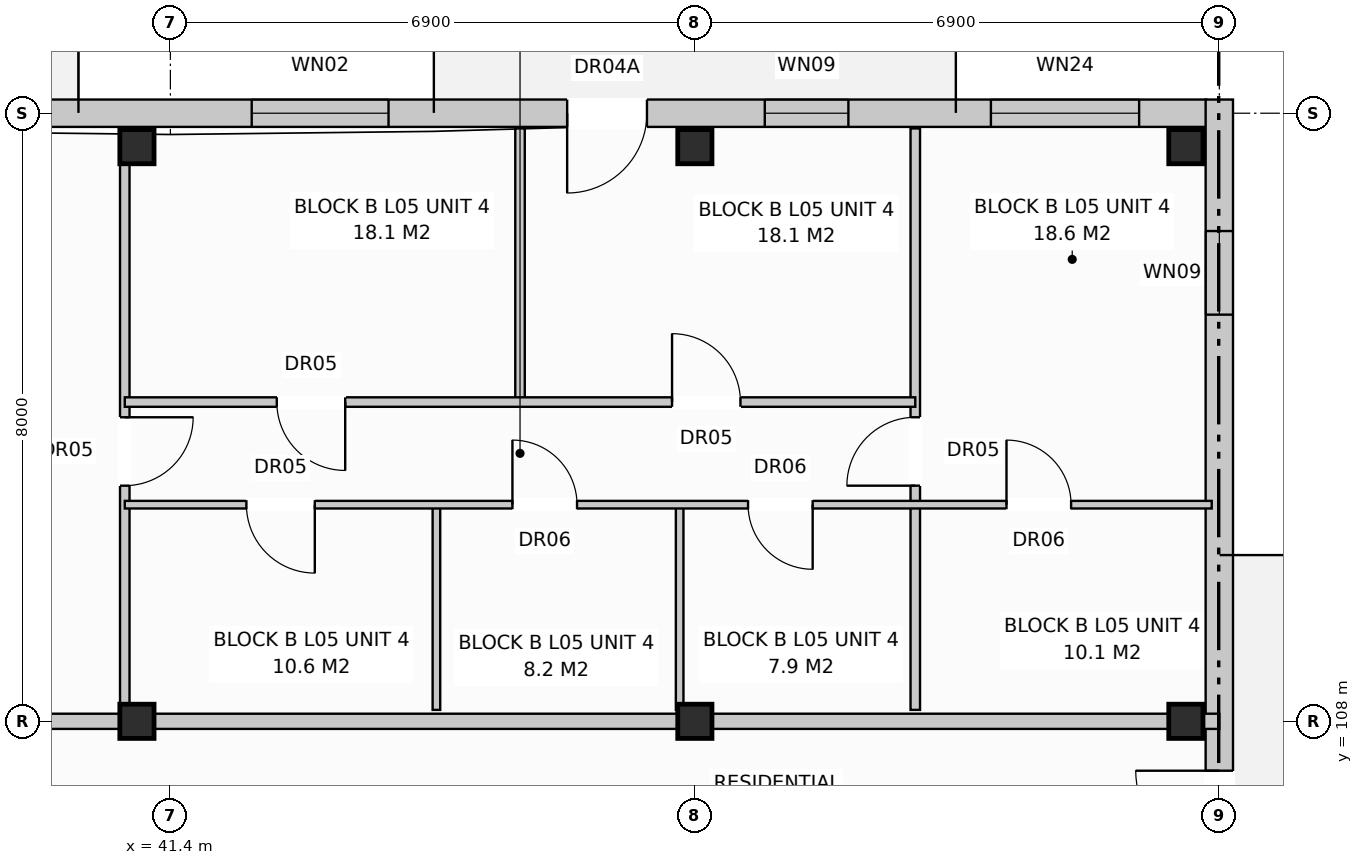
"""IFC4 building model, lengths in metres.
Left out: names, types, materials, properties, quantities, classifications, styles, units other than length and angle.
Written with IfcOpenShell. Run it as: python <this file> out.ifc"""

import sys

from ifc_helpers import new_model, si_unit, direction, frame, frame_2d, origin, origin_with_axes, origin_2d, place, context, subcontext, project, spatial, rectangle, extrude, element, fill, save


model = new_model("IFC4")
c1 = context("Model", 3, precision=1e-05, world=origin(), true_north=direction((0.0, 1.0)))
c2 = subcontext(c1, "Body", "Model", "MODEL_VIEW")
j1 = project(units=[si_unit("LENGTHUNIT", "METRE"), si_unit("PLANEANGLEUNIT", "RADIAN")], contexts=[c1])
p1 = place(None, origin())
s1 = spatial("IfcSite", under=j1, at=p1, CompositionType="ELEMENT")
p2 = place(p1, origin())
s2 = spatial("IfcBuilding", under=s1, at=p2, CompositionType="ELEMENT")
p3 = place(p2, frame((0.0, 0.0, 17.6)))
s3 = spatial("IfcBuildingStorey", under=s2, at=p3, CompositionType="ELEMENT", Elevation=17.6)
for number, where, z_axis, x_axis in (
    (1, (40.96, 108.0, 0.0), (0.0, 0.0, 1.0), (1.0, 0.0, 0.0)),
    (2, (40.96, 115.56, 0.0), (0.0, 0.0, 1.0), (1.0, 0.0, 0.0)),
    (3, (48.3, 108.0, 0.0), (0.0, 0.0, 1.0), (1.0, 0.0, 0.0)),
    (4, (48.3, 115.56, 0.0), (0.0, 0.0, 1.0), (1.0, 0.0, 0.0)),
    (5, (54.76, 108.0, 0.0), (0.0, 0.0, 1.0), (1.0, 0.0, 0.0)),
    (6, (54.76, 115.56, 0.0), (0.0, 0.0, 1.0), (1.0, 0.0, 0.0)),
):
    element("IfcColumn", number, at=place(p3, frame(where, z_axis=z_axis, x_axis=x_axis)), inside=s3, PredefinedType="COLUMN", context=c2, shape_type="SweptSolid", body=[
        extrude(rectangle(XDim=0.45, YDim=0.45, at=origin_2d()), origin(), (0.0, 0.0, 1.0), 3.2),
    ])
p4 = place(p3, frame((0.17, 116.0, 0.0), z_axis=(0.0, 0.0, 1.0), x_axis=(1.0, 0.0, 0.0)))
e7 = element("IfcWall", 7, at=p4, inside=s3, PredefinedType="STANDARD", context=c2, shape_type="SweptSolid", body=[
    extrude(rectangle(XDim=54.86, YDim=0.36, at=frame_2d((27.43, 0.0))), origin(), (0.0, 0.0, 1.0), 2.95),
])
p5 = place(p4, frame((2.459, 0.0, 0.0)))
e8 = element("IfcOpeningElement", 8, at=p5, cuts=e7, PredefinedType="OPENING", context=c2, shape_type="SweptSolid", body=[
    extrude(rectangle(XDim=1.05, YDim=2.12, at=frame_2d((0.525, 1.06))), frame((0.0, 0.192, 0.0), z_axis=(0.0, -1.0, 0.0), x_axis=(1.0, 0.0, 0.0)), (0.0, 0.0, 1.0), 0.384),
])
p6 = place(p4, frame((18.85, 0.0, 0.0)))
e9 = element("IfcOpeningElement", 9, at=p6, cuts=e7, PredefinedType="OPENING", context=c2, shape_type="SweptSolid", body=[
    extrude(rectangle(XDim=1.05, YDim=2.12, at=frame_2d((0.525, 1.06))), frame((0.0, 0.192, 0.0), z_axis=(0.0, -1.0, 0.0), x_axis=(1.0, 0.0, 0.0)), (0.0, 0.0, 1.0), 0.384),
])
p7 = place(p4, frame((28.76, 0.0, 0.0)))
e10 = element("IfcOpeningElement", 10, at=p7, cuts=e7, PredefinedType="OPENING", context=c2, shape_type="SweptSolid", body=[
    extrude(rectangle(XDim=1.05, YDim=2.12, at=frame_2d((0.525, 1.06))), frame((0.0, 0.192, 0.0), z_axis=(0.0, -1.0, 0.0), x_axis=(1.0, 0.0, 0.0)), (0.0, 0.0, 1.0), 0.384),
])
p8 = place(p4, frame((46.45, 0.0, 0.0)))
e11 = element("IfcOpeningElement", 11, at=p8, cuts=e7, PredefinedType="OPENING", context=c2, shape_type="SweptSolid", body=[
    extrude(rectangle(XDim=1.05, YDim=2.12, at=frame_2d((0.525, 1.06))), frame((0.0, 0.192, 0.0), z_axis=(0.0, -1.0, 0.0), x_axis=(1.0, 0.0, 0.0)), (0.0, 0.0, 1.0), 0.384),
])
p9 = place(p4, frame((0.75, 0.0, 0.72)))
e12 = element("IfcOpeningElement", 12, at=p9, cuts=e7, PredefinedType="OPENING", context=c2, shape_type="SweptSolid", body=[
    extrude(rectangle(XDim=1.1, YDim=1.5, at=frame_2d((0.55, 0.75))), frame((0.0, 0.192, 0.0), z_axis=(0.0, -1.0, 0.0), x_axis=(1.0, 0.0, 0.0)), (0.0, 0.0, 1.0), 0.384),
])
p10 = place(p4, frame((4.225, 0.0, 0.8)))
e13 = element("IfcOpeningElement", 13, at=p10, cuts=e7, PredefinedType="OPENING", context=c2, shape_type="SweptSolid", body=[
    extrude(rectangle(XDim=1.95, YDim=1.65, at=frame_2d((0.975, 0.825))), frame((0.0, 0.192, 0.0), z_axis=(0.0, -1.0, 0.0), x_axis=(1.0, 0.0, 0.0)), (0.0, 0.0, 1.0), 0.384),
])
p11 = place(p4, frame((8.0, 0.0, 0.8)))
e14 = element("IfcOpeningElement", 14, at=p11, cuts=e7, PredefinedType="OPENING", context=c2, shape_type="SweptSolid", body=[
    extrude(rectangle(XDim=1.8, YDim=1.7, at=frame_2d((0.9, 0.85))), frame((0.0, 0.192, 0.0), z_axis=(0.0, -1.0, 0.0), x_axis=(1.0, 0.0, 0.0)), (0.0, 0.0, 1.0), 0.384),
])
p12 = place(p4, frame((11.65, 0.0, 0.72)))
e15 = element("IfcOpeningElement", 15, at=p12, cuts=e7, PredefinedType="OPENING", context=c2, shape_type="SweptSolid", body=[
    extrude(rectangle(XDim=1.1, YDim=1.5, at=frame_2d((0.55, 0.75))), frame((0.0, 0.192, 0.0), z_axis=(0.0, -1.0, 0.0), x_axis=(1.0, 0.0, 0.0)), (0.0, 0.0, 1.0), 0.384),
])
p13 = place(p4, frame((16.675, 0.0, 0.8)))
e16 = element("IfcOpeningElement", 16, at=p13, cuts=e7, PredefinedType="OPENING", context=c2, shape_type="SweptSolid", body=[
    extrude(rectangle(XDim=1.95, YDim=1.65, at=frame_2d((0.975, 0.825))), frame((0.0, 0.192, 0.0), z_axis=(0.0, -1.0, 0.0), x_axis=(1.0, 0.0, 0.0)), (0.0, 0.0, 1.0), 0.384),
])
p14 = place(p4, frame((22.3, 0.0, 0.8)))
e17 = element("IfcOpeningElement", 17, at=p14, cuts=e7, PredefinedType="OPENING", context=c2, shape_type="SweptSolid", body=[
    extrude(rectangle(XDim=1.8, YDim=1.7, at=frame_2d((0.9, 0.85))), frame((0.0, 0.192, 0.0), z_axis=(0.0, -1.0, 0.0), x_axis=(1.0, 0.0, 0.0)), (0.0, 0.0, 1.0), 0.384),
])
p15 = place(p4, frame((31.15, 0.0, 0.72)))
e18 = element("IfcOpeningElement", 18, at=p15, cuts=e7, PredefinedType="OPENING", context=c2, shape_type="SweptSolid", body=[
    extrude(rectangle(XDim=1.9, YDim=1.85, at=frame_2d((0.95, 0.925))), frame((0.0, 0.192, 0.0), z_axis=(0.0, -1.0, 0.0), x_axis=(1.0, 0.0, 0.0)), (0.0, 0.0, 1.0), 0.384),
])
p16 = place(p4, frame((36.525, 0.0, 0.8)))
e19 = element("IfcOpeningElement", 19, at=p16, cuts=e7, PredefinedType="OPENING", context=c2, shape_type="SweptSolid", body=[
    extrude(rectangle(XDim=1.95, YDim=1.65, at=frame_2d((0.975, 0.825))), frame((0.0, 0.192, 0.0), z_axis=(0.0, -1.0, 0.0), x_axis=(1.0, 0.0, 0.0)), (0.0, 0.0, 1.0), 0.384),
])
p17 = place(p4, frame((42.3, 0.0, 0.8)))
e20 = element("IfcOpeningElement", 20, at=p17, cuts=e7, PredefinedType="OPENING", context=c2, shape_type="SweptSolid", body=[
    extrude(rectangle(XDim=1.8, YDim=1.7, at=frame_2d((0.9, 0.85))), frame((0.0, 0.192, 0.0), z_axis=(0.0, -1.0, 0.0), x_axis=(1.0, 0.0, 0.0)), (0.0, 0.0, 1.0), 0.384),
])
p18 = place(p4, frame((49.05, 0.0, 0.72)))
e21 = element("IfcOpeningElement", 21, at=p18, cuts=e7, PredefinedType="OPENING", context=c2, shape_type="SweptSolid", body=[
    extrude(rectangle(XDim=1.1, YDim=1.5, at=frame_2d((0.55, 0.75))), frame((0.0, 0.192, 0.0), z_axis=(0.0, -1.0, 0.0), x_axis=(1.0, 0.0, 0.0)), (0.0, 0.0, 1.0), 0.384),
])
p19 = place(p4, frame((52.025, 0.0, 0.8)))
e22 = element("IfcOpeningElement", 22, at=p19, cuts=e7, PredefinedType="OPENING", context=c2, shape_type="SweptSolid", body=[
    extrude(rectangle(XDim=1.95, YDim=1.65, at=frame_2d((0.975, 0.825))), frame((0.0, 0.192, 0.0), z_axis=(0.0, -1.0, 0.0), x_axis=(1.0, 0.0, 0.0)), (0.0, 0.0, 1.0), 0.384),
])
p20 = place(p3, frame((55.2, 97.42, 0.0), z_axis=(0.0, 0.0, 1.0), x_axis=(0.0, 1.0, 0.0)))
e23 = element("IfcWall", 23, at=p20, inside=s3, PredefinedType="STANDARD", context=c2, shape_type="SweptSolid", body=[
    extrude(rectangle(XDim=18.76, YDim=0.36, at=frame_2d((9.38, 0.0))), origin(), (0.0, 0.0, 1.0), 2.95),
])
p21 = place(p20, frame((8.83, 0.0, 0.0)))
e24 = element("IfcOpeningElement", 24, at=p21, cuts=e23, PredefinedType="OPENING", context=c2, shape_type="SweptSolid", body=[
    extrude(rectangle(XDim=1.1, YDim=2.1, at=frame_2d((0.55, 1.05))), frame((0.0, 0.192, 0.0), z_axis=(0.0, -1.0, 0.0), x_axis=(1.0, 0.0, 0.0)), (0.0, 0.0, 1.0), 0.384),
])
p22 = place(p20, frame((1.73, 0.0, 0.72)))
e25 = element("IfcOpeningElement", 25, at=p22, cuts=e23, PredefinedType="OPENING", context=c2, shape_type="SweptSolid", body=[
    extrude(rectangle(XDim=1.1, YDim=1.5, at=frame_2d((0.55, 0.75))), frame((0.0, 0.192, 0.0), z_axis=(0.0, -1.0, 0.0), x_axis=(1.0, 0.0, 0.0)), (0.0, 0.0, 1.0), 0.384),
])
p23 = place(p20, frame((15.93, 0.0, 0.72)))
e26 = element("IfcOpeningElement", 26, at=p23, cuts=e23, PredefinedType="OPENING", context=c2, shape_type="SweptSolid", body=[
    extrude(rectangle(XDim=1.1, YDim=1.5, at=frame_2d((0.55, 0.75))), frame((0.0, 0.192, 0.0), z_axis=(0.0, -1.0, 0.0), x_axis=(1.0, 0.0, 0.0)), (0.0, 0.0, 1.0), 0.384),
])
p24 = place(p3, frame((34.5, 108.0, 0.0), z_axis=(0.0, 0.0, 1.0), x_axis=(1.0, 0.0, 0.0)))
e27 = element("IfcWall", 27, at=p24, inside=s3, PredefinedType="PARTITIONING", context=c2, shape_type="SweptSolid", body=[
    extrude(rectangle(XDim=20.7, YDim=0.2, at=frame_2d((10.35, 0.0))), origin(), (0.0, 0.0, 1.0), 2.39),
])
p25 = place(p24, frame((2.4, 0.0, 0.0)))
e28 = element("IfcOpeningElement", 28, at=p25, cuts=e27, PredefinedType="OPENING", context=c2, shape_type="SweptSolid", body=[
    extrude(rectangle(XDim=0.95, YDim=2.15, at=frame_2d((0.475, 1.075))), frame((0.0, 0.112, 0.0), z_axis=(0.0, -1.0, 0.0), x_axis=(1.0, 0.0, 0.0)), (0.0, 0.0, 1.0), 0.224),
])
p26 = place(p3, frame((40.8, 108.15, 0.0), z_axis=(0.0, 0.0, 1.0), x_axis=(0.0, 1.0, 0.0)))
e29 = element("IfcWall", 29, at=p26, inside=s3, PredefinedType="PARTITIONING", context=c2, shape_type="SweptSolid", body=[
    extrude(rectangle(XDim=7.65, YDim=0.125, at=frame_2d((3.825, 0.0))), origin(), (0.0, 0.0, 1.0), 2.59),
])
p27 = place(p26, frame((2.95, 0.0, 0.0)))
e30 = element("IfcOpeningElement", 30, at=p27, cuts=e29, PredefinedType="OPENING", context=c2, shape_type="SweptSolid", body=[
    extrude(rectangle(XDim=0.9, YDim=2.1, at=frame_2d((0.45, 1.05))), frame((0.0, 0.074, 0.0), z_axis=(0.0, -1.0, 0.0), x_axis=(1.0, 0.0, 0.0)), (0.0, 0.0, 1.0), 0.149),
])
p28 = place(p3, frame((44.9, 108.15, 0.0), z_axis=(0.0, 0.0, 1.0), x_axis=(0.0, 1.0, 0.0)))
e31 = element("IfcWall", 31, at=p28, inside=s3, PredefinedType="PARTITIONING", context=c2, shape_type="SweptSolid", body=[
    extrude(rectangle(XDim=2.7, YDim=0.1, at=frame_2d((1.35, 0.0))), origin(), (0.0, 0.0, 1.0), 2.95),
])
p29 = place(p3, frame((48.1, 108.15, 0.0), z_axis=(0.0, 0.0, 1.0), x_axis=(0.0, 1.0, 0.0)))
e32 = element("IfcWall", 32, at=p29, inside=s3, PredefinedType="PARTITIONING", context=c2, shape_type="SweptSolid", body=[
    extrude(rectangle(XDim=2.7, YDim=0.1, at=frame_2d((1.35, 0.0))), origin(), (0.0, 0.0, 1.0), 2.39),
])
p30 = place(p3, frame((46.0, 112.2, 0.0), z_axis=(0.0, 0.0, 1.0), x_axis=(0.0, 1.0, 0.0)))
e33 = element("IfcWall", 33, at=p30, inside=s3, PredefinedType="PARTITIONING", context=c2, shape_type="SweptSolid", body=[
    extrude(rectangle(XDim=3.6, YDim=0.125, at=frame_2d((1.8, 0.0))), origin(), (0.0, 0.0, 1.0), 2.59),
])
p31 = place(p3, frame((51.2, 108.15, 0.0), z_axis=(0.0, 0.0, 1.0), x_axis=(0.0, 1.0, 0.0)))
e34 = element("IfcWall", 34, at=p31, inside=s3, PredefinedType="PARTITIONING", context=c2, shape_type="SweptSolid", body=[
    extrude(rectangle(XDim=7.65, YDim=0.125, at=frame_2d((3.825, 0.0))), origin(), (0.0, 0.0, 1.0), 2.95),
])
p32 = place(p31, frame((2.95, 0.0, 0.0)))
e35 = element("IfcOpeningElement", 35, at=p32, cuts=e34, PredefinedType="OPENING", context=c2, shape_type="SweptSolid", body=[
    extrude(rectangle(XDim=0.9, YDim=2.1, at=frame_2d((0.45, 1.05))), frame((0.0, 0.074, 0.0), z_axis=(0.0, -1.0, 0.0), x_axis=(1.0, 0.0, 0.0)), (0.0, 0.0, 1.0), 0.149),
])
p33 = place(p3, frame((40.8, 110.85, 0.0), z_axis=(0.0, 0.0, 1.0), x_axis=(1.0, 0.0, 0.0)))
e36 = element("IfcWall", 36, at=p33, inside=s3, PredefinedType="PARTITIONING", context=c2, shape_type="SweptSolid", body=[
    extrude(rectangle(XDim=14.3, YDim=0.1, at=frame_2d((7.15, 0.0))), origin(), (0.0, 0.0, 1.0), 2.95),
])
p34 = place(p33, frame((1.6, 0.0, 0.0)))
e37 = element("IfcOpeningElement", 37, at=p34, cuts=e36, PredefinedType="OPENING", context=c2, shape_type="SweptSolid", body=[
    extrude(rectangle(XDim=0.9, YDim=2.1, at=frame_2d((0.45, 1.05))), frame((0.0, 0.062, 0.0), z_axis=(0.0, -1.0, 0.0), x_axis=(1.0, 0.0, 0.0)), (0.0, 0.0, 1.0), 0.124),
])
p35 = place(p33, frame((5.1, 0.0, 0.0)))
e38 = element("IfcOpeningElement", 38, at=p35, cuts=e36, PredefinedType="OPENING", context=c2, shape_type="SweptSolid", body=[
    extrude(rectangle(XDim=0.85, YDim=2.05, at=frame_2d((0.425, 1.025))), frame((0.0, 0.062, 0.0), z_axis=(0.0, -1.0, 0.0), x_axis=(1.0, 0.0, 0.0)), (0.0, 0.0, 1.0), 0.124),
])
p36 = place(p33, frame((8.2, 0.0, 0.0)))
e39 = element("IfcOpeningElement", 39, at=p36, cuts=e36, PredefinedType="OPENING", context=c2, shape_type="SweptSolid", body=[
    extrude(rectangle(XDim=0.85, YDim=2.05, at=frame_2d((0.425, 1.025))), frame((0.0, 0.062, 0.0), z_axis=(0.0, -1.0, 0.0), x_axis=(1.0, 0.0, 0.0)), (0.0, 0.0, 1.0), 0.124),
])
p37 = place(p33, frame((11.6, 0.0, 0.0)))
e40 = element("IfcOpeningElement", 40, at=p37, cuts=e36, PredefinedType="OPENING", context=c2, shape_type="SweptSolid", body=[
    extrude(rectangle(XDim=0.85, YDim=2.05, at=frame_2d((0.425, 1.025))), frame((0.0, 0.062, 0.0), z_axis=(0.0, -1.0, 0.0), x_axis=(1.0, 0.0, 0.0)), (0.0, 0.0, 1.0), 0.124),
])
p38 = place(p3, frame((40.8, 112.2, 0.0), z_axis=(0.0, 0.0, 1.0), x_axis=(1.0, 0.0, 0.0)))
e41 = element("IfcWall", 41, at=p38, inside=s3, PredefinedType="PARTITIONING", context=c2, shape_type="SweptSolid", body=[
    extrude(rectangle(XDim=10.4, YDim=0.125, at=frame_2d((5.2, 0.0))), origin(), (0.0, 0.0, 1.0), 2.95),
])
p39 = place(p38, frame((2.0, 0.0, 0.0)))
e42 = element("IfcOpeningElement", 42, at=p39, cuts=e41, PredefinedType="OPENING", context=c2, shape_type="SweptSolid", body=[
    extrude(rectangle(XDim=0.9, YDim=2.1, at=frame_2d((0.45, 1.05))), frame((0.0, 0.074, 0.0), z_axis=(0.0, -1.0, 0.0), x_axis=(1.0, 0.0, 0.0)), (0.0, 0.0, 1.0), 0.149),
])
p40 = place(p38, frame((7.2, 0.0, 0.0)))
e43 = element("IfcOpeningElement", 43, at=p40, cuts=e41, PredefinedType="OPENING", context=c2, shape_type="SweptSolid", body=[
    extrude(rectangle(XDim=0.9, YDim=2.1, at=frame_2d((0.45, 1.05))), frame((0.0, 0.074, 0.0), z_axis=(0.0, -1.0, 0.0), x_axis=(1.0, 0.0, 0.0)), (0.0, 0.0, 1.0), 0.149),
])
p41 = place(p8, frame((1.05, 0.0, 0.0), z_axis=(0.0, 0.0, 1.0), x_axis=(-1.0, 0.0, 0.0)))
e44 = element("IfcDoor", 44, at=p41, inside=s3, OperationType="SINGLE_SWING_LEFT", PredefinedType="DOOR", context=c2, shape_type="SweptSolid", body=[
    extrude(rectangle(XDim=1.05, YDim=2.12, at=frame_2d((0.525, 1.06))), frame((0.0, 0.025, 0.0), z_axis=(0.0, -1.0, 0.0), x_axis=(1.0, 0.0, 0.0)), (0.0, 0.0, 1.0), 0.05),
])
fill(e11, e44)
p42 = place(p17, origin_with_axes())
e45 = element("IfcWindow", 45, at=p42, inside=s3, PartitioningType="SINGLE_PANEL", PredefinedType="WINDOW", context=c2, shape_type="SweptSolid", body=[
    extrude(rectangle(XDim=1.8, YDim=1.7, at=frame_2d((0.9, 0.85))), frame((0.0, 0.03, 0.0), z_axis=(0.0, -1.0, 0.0), x_axis=(1.0, 0.0, 0.0)), (0.0, 0.0, 1.0), 0.06),
])
fill(e20, e45)
p43 = place(p18, origin_with_axes())
e46 = element("IfcWindow", 46, at=p43, inside=s3, PartitioningType="SINGLE_PANEL", PredefinedType="WINDOW", context=c2, shape_type="SweptSolid", body=[
    extrude(rectangle(XDim=1.1, YDim=1.5, at=frame_2d((0.55, 0.75))), frame((0.0, 0.03, 0.0), z_axis=(0.0, -1.0, 0.0), x_axis=(1.0, 0.0, 0.0)), (0.0, 0.0, 1.0), 0.06),
])
fill(e21, e46)
p44 = place(p19, origin_with_axes())
e47 = element("IfcWindow", 47, at=p44, inside=s3, PartitioningType="SINGLE_PANEL", PredefinedType="WINDOW", context=c2, shape_type="SweptSolid", body=[
    extrude(rectangle(XDim=1.95, YDim=1.65, at=frame_2d((0.975, 0.825))), frame((0.0, 0.03, 0.0), z_axis=(0.0, -1.0, 0.0), x_axis=(1.0, 0.0, 0.0)), (0.0, 0.0, 1.0), 0.06),
])
fill(e22, e47)
p45 = place(p21, origin_with_axes())
e48 = element("IfcDoor", 48, at=p45, inside=s3, OperationType="SINGLE_SWING_RIGHT", PredefinedType="DOOR", context=c2, shape_type="SweptSolid", body=[
    extrude(rectangle(XDim=1.1, YDim=2.1, at=frame_2d((0.55, 1.05))), frame((0.0, 0.025, 0.0), z_axis=(0.0, -1.0, 0.0), x_axis=(1.0, 0.0, 0.0)), (0.0, 0.0, 1.0), 0.05),
])
fill(e24, e48)
p46 = place(p23, origin_with_axes())
e49 = element("IfcWindow", 49, at=p46, inside=s3, PartitioningType="SINGLE_PANEL", PredefinedType="WINDOW", context=c2, shape_type="SweptSolid", body=[
    extrude(rectangle(XDim=1.1, YDim=1.5, at=frame_2d((0.55, 0.75))), frame((0.0, 0.03, 0.0), z_axis=(0.0, -1.0, 0.0), x_axis=(1.0, 0.0, 0.0)), (0.0, 0.0, 1.0), 0.06),
])
fill(e26, e49)
p47 = place(p27, frame((0.9, 0.0, 0.0), z_axis=(0.0, 0.0, 1.0), x_axis=(-1.0, 0.0, 0.0)))
e50 = element("IfcDoor", 50, at=p47, inside=s3, OperationType="SINGLE_SWING_RIGHT", PredefinedType="DOOR", context=c2, shape_type="SweptSolid", body=[
    extrude(rectangle(XDim=0.9, YDim=2.1, at=frame_2d((0.45, 1.05))), frame((0.0, 0.025, 0.0), z_axis=(0.0, -1.0, 0.0), x_axis=(1.0, 0.0, 0.0)), (0.0, 0.0, 1.0), 0.05),
])
fill(e30, e50)
p48 = place(p32, origin_with_axes())
e51 = element("IfcDoor", 51, at=p48, inside=s3, OperationType="SINGLE_SWING_LEFT", PredefinedType="DOOR", context=c2, shape_type="SweptSolid", body=[
    extrude(rectangle(XDim=0.9, YDim=2.1, at=frame_2d((0.45, 1.05))), frame((0.0, 0.025, 0.0), z_axis=(0.0, -1.0, 0.0), x_axis=(1.0, 0.0, 0.0)), (0.0, 0.0, 1.0), 0.05),
])
fill(e35, e51)
p49 = place(p34, frame((0.9, 0.0, 0.0), z_axis=(0.0, 0.0, 1.0), x_axis=(-1.0, 0.0, 0.0)))
e52 = element("IfcDoor", 52, at=p49, inside=s3, OperationType="SINGLE_SWING_RIGHT", PredefinedType="DOOR", context=c2, shape_type="SweptSolid", body=[
    extrude(rectangle(XDim=0.9, YDim=2.1, at=frame_2d((0.45, 1.05))), frame((0.0, 0.025, 0.0), z_axis=(0.0, -1.0, 0.0), x_axis=(1.0, 0.0, 0.0)), (0.0, 0.0, 1.0), 0.05),
])
fill(e37, e52)
p50 = place(p35, origin_with_axes())
e53 = element("IfcDoor", 53, at=p50, inside=s3, OperationType="SINGLE_SWING_LEFT", PredefinedType="DOOR", context=c2, shape_type="SweptSolid", body=[
    extrude(rectangle(XDim=0.85, YDim=2.05, at=frame_2d((0.425, 1.025))), frame((0.0, 0.025, 0.0), z_axis=(0.0, -1.0, 0.0), x_axis=(1.0, 0.0, 0.0)), (0.0, 0.0, 1.0), 0.05),
])
fill(e38, e53)
p51 = place(p36, frame((0.85, 0.0, 0.0), z_axis=(0.0, 0.0, 1.0), x_axis=(-1.0, 0.0, 0.0)))
e54 = element("IfcDoor", 54, at=p51, inside=s3, OperationType="SINGLE_SWING_RIGHT", PredefinedType="DOOR", context=c2, shape_type="SweptSolid", body=[
    extrude(rectangle(XDim=0.85, YDim=2.05, at=frame_2d((0.425, 1.025))), frame((0.0, 0.025, 0.0), z_axis=(0.0, -1.0, 0.0), x_axis=(1.0, 0.0, 0.0)), (0.0, 0.0, 1.0), 0.05),
])
fill(e39, e54)
p52 = place(p37, origin_with_axes())
e55 = element("IfcDoor", 55, at=p52, inside=s3, OperationType="SINGLE_SWING_LEFT", PredefinedType="DOOR", context=c2, shape_type="SweptSolid", body=[
    extrude(rectangle(XDim=0.85, YDim=2.05, at=frame_2d((0.425, 1.025))), frame((0.0, 0.025, 0.0), z_axis=(0.0, -1.0, 0.0), x_axis=(1.0, 0.0, 0.0)), (0.0, 0.0, 1.0), 0.05),
])
fill(e40, e55)
p53 = place(p39, frame((0.9, 0.0, 0.0), z_axis=(0.0, 0.0, 1.0), x_axis=(-1.0, 0.0, 0.0)))
e56 = element("IfcDoor", 56, at=p53, inside=s3, OperationType="SINGLE_SWING_RIGHT", PredefinedType="DOOR", context=c2, shape_type="SweptSolid", body=[
    extrude(rectangle(XDim=0.9, YDim=2.1, at=frame_2d((0.45, 1.05))), frame((0.0, 0.025, 0.0), z_axis=(0.0, -1.0, 0.0), x_axis=(1.0, 0.0, 0.0)), (0.0, 0.0, 1.0), 0.05),
])
fill(e42, e56)
p54 = place(p40, origin_with_axes())
e57 = element("IfcDoor", 57, at=p54, inside=s3, OperationType="SINGLE_SWING_LEFT", PredefinedType="DOOR", context=c2, shape_type="SweptSolid", body=[
    extrude(rectangle(XDim=0.9, YDim=2.1, at=frame_2d((0.45, 1.05))), frame((0.0, 0.025, 0.0), z_axis=(0.0, -1.0, 0.0), x_axis=(1.0, 0.0, 0.0)), (0.0, 0.0, 1.0), 0.05),
])
fill(e43, e57)
save(model, sys.argv[1])
